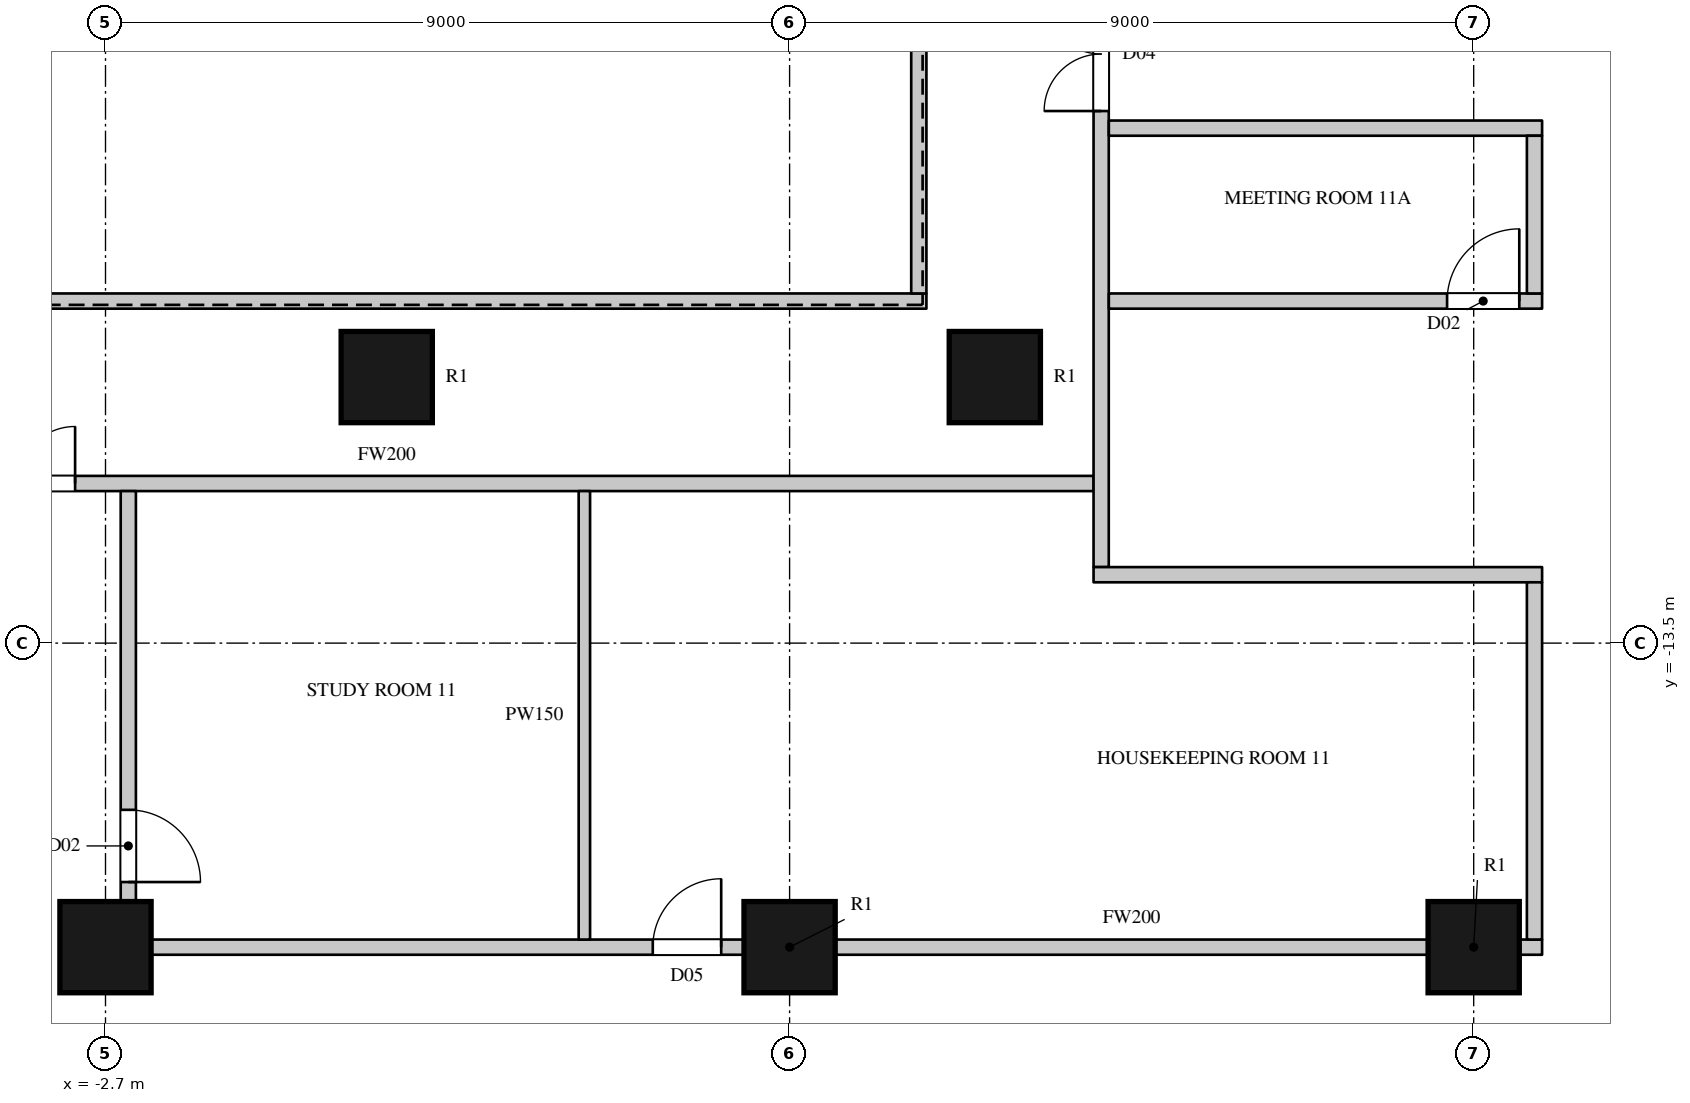
"""IFC4 building model, lengths in metres.
Left out: names, types, materials, properties, quantities, classifications, styles, units other than length and angle.
Written with IfcOpenShell. Run it as: python <this file> out.ifc"""

import sys

from ifc_helpers import new_model, si_unit, direction, frame, frame_2d, origin, origin_2d, place, context, subcontext, project, spatial, rectangle, circle, extrude, element, fill, save


model = new_model("IFC4")
c1 = context("Model", 3, precision=1e-05, world=origin(), true_north=direction((0.0, 1.0)))
c2 = subcontext(c1, "Body", "Model", "MODEL_VIEW")
j1 = project(units=[si_unit("LENGTHUNIT", "METRE"), si_unit("PLANEANGLEUNIT", "RADIAN")], contexts=[c1])
p1 = place(None, origin())
s1 = spatial("IfcSite", under=j1, at=p1, CompositionType="ELEMENT")
p2 = place(p1, origin())
s2 = spatial("IfcBuilding", under=s1, at=p2, CompositionType="ELEMENT")
p3 = place(p2, frame((0.0, 0.0, 69.9)))
s3 = spatial("IfcBuildingStorey", under=s2, at=p3, CompositionType="ELEMENT", Elevation=69.9)
for number, where, z_axis, x_axis in (
    (1, (-2.7, -17.5, 0.0), (0.0, 0.0, 1.0), (1.0, 0.0, 0.0)),
    (2, (6.3, -17.5, 0.0), (0.0, 0.0, 1.0), (1.0, 0.0, 0.0)),
    (3, (15.3, -17.5, 0.0), (0.0, 0.0, 1.0), (1.0, 0.0, 0.0)),
    (4, (1.0, -10.0, 0.0), (0.0, 0.0, 1.0), (1.0, 0.0, 0.0)),
    (5, (9.0, -10.0, 0.0), (0.0, 0.0, 1.0), (1.0, 0.0, 0.0)),
):
    element("IfcColumn", number, at=place(p3, frame(where, z_axis=z_axis, x_axis=x_axis)), inside=s3, PredefinedType="COLUMN", context=c2, shape_type="SweptSolid", body=[
        extrude(circle(Radius=0.6, at=origin_2d()), origin(), (0.0, 0.0, 1.0), 3.6),
    ])
p4 = place(p3, frame((-8.3, -11.4, 0.0), z_axis=(0.0, 0.0, 1.0), x_axis=(1.0, 0.0, 0.0)))
e6 = element("IfcWall", 6, at=p4, inside=s3, PredefinedType="PARTITIONING", context=c2, shape_type="SweptSolid", body=[
    extrude(rectangle(XDim=18.6, YDim=0.2, at=frame_2d((9.3, 0.0))), origin(), (0.0, 0.0, 1.0), 3.3),
])
p5 = place(p4, frame((3.7, 0.0, 0.0)))
e7 = element("IfcOpeningElement", 7, at=p5, cuts=e6, PredefinedType="OPENING", context=c2, shape_type="SweptSolid", body=[
    extrude(rectangle(XDim=1.5, YDim=2.2, at=frame_2d((0.75, 1.1))), frame((0.0, 0.11, 0.0), z_axis=(0.0, -1.0, 0.0), x_axis=(1.0, 0.0, 0.0)), (0.0, 0.0, 1.0), 0.22),
])
p6 = place(p3, frame((-6.1, -9.0, 0.0), z_axis=(0.0, 0.0, 1.0), x_axis=(1.0, 0.0, 0.0)))
e8 = element("IfcWall", 8, at=p6, inside=s3, PredefinedType="PARTITIONING", context=c2, shape_type="SweptSolid", body=[
    extrude(rectangle(XDim=14.2, YDim=0.2, at=frame_2d((7.1, 0.0))), origin(), (0.0, 0.0, 1.0), 3.3),
])
p7 = place(p3, frame((-2.4, -16.943, 0.0), z_axis=(0.0, 0.0, 1.0), x_axis=(0.0, 1.0, 0.0)))
e9 = element("IfcWall", 9, at=p7, inside=s3, PredefinedType="PARTITIONING", context=c2, shape_type="SweptSolid", body=[
    extrude(rectangle(XDim=5.443, YDim=0.2, at=frame_2d((2.722, 0.0))), origin(), (0.0, 0.0, 1.0), 3.3),
])
p8 = place(p7, frame((0.3, 0.0, 0.0)))
e10 = element("IfcOpeningElement", 10, at=p8, cuts=e9, PredefinedType="OPENING", context=c2, shape_type="SweptSolid", body=[
    extrude(rectangle(XDim=0.95, YDim=2.2, at=frame_2d((0.475, 1.1))), frame((0.0, 0.11, 0.0), z_axis=(0.0, -1.0, 0.0), x_axis=(1.0, 0.0, 0.0)), (0.0, 0.0, 1.0), 0.22),
])
p9 = place(p3, frame((-2.1, -17.5, 0.0), z_axis=(0.0, 0.0, 1.0), x_axis=(1.0, 0.0, 0.0)))
e11 = element("IfcWall", 11, at=p9, inside=s3, PredefinedType="PARTITIONING", context=c2, shape_type="SweptSolid", body=[
    extrude(rectangle(XDim=7.8, YDim=0.2, at=frame_2d((3.9, 0.0))), origin(), (0.0, 0.0, 1.0), 2.75),
])
p10 = place(p9, frame((6.6, 0.0, 0.0)))
e12 = element("IfcOpeningElement", 12, at=p10, cuts=e11, PredefinedType="OPENING", context=c2, shape_type="SweptSolid", body=[
    extrude(rectangle(XDim=0.9, YDim=2.2, at=frame_2d((0.45, 1.1))), frame((0.0, 0.11, 0.0), z_axis=(0.0, -1.0, 0.0), x_axis=(1.0, 0.0, 0.0)), (0.0, 0.0, 1.0), 0.22),
])
p11 = place(p3, frame((6.9, -17.5, 0.0), z_axis=(0.0, 0.0, 1.0), x_axis=(1.0, 0.0, 0.0)))
e13 = element("IfcWall", 13, at=p11, inside=s3, PredefinedType="PARTITIONING", context=c2, shape_type="SweptSolid", body=[
    extrude(rectangle(XDim=7.8, YDim=0.2, at=frame_2d((3.9, 0.0))), origin(), (0.0, 0.0, 1.0), 2.75),
])
p12 = place(p3, frame((15.9, -17.5, 0.0), z_axis=(0.0, 0.0, 1.0), x_axis=(1.0, 0.0, 0.0)))
e14 = element("IfcWall", 14, at=p12, inside=s3, PredefinedType="PARTITIONING", context=c2, shape_type="SweptSolid", body=[
    extrude(rectangle(XDim=0.3, YDim=0.2, at=frame_2d((0.15, 0.0))), origin(), (0.0, 0.0, 1.0), 3.3),
])
p13 = place(p3, frame((8.0, -8.9, 0.0), z_axis=(0.0, 0.0, 1.0), x_axis=(0.0, 1.0, 0.0)))
e15 = element("IfcWall", 15, at=p13, inside=s3, PredefinedType="PARTITIONING", context=c2, shape_type="SweptSolid", body=[
    extrude(rectangle(XDim=17.8, YDim=0.2, at=frame_2d((8.9, 0.0))), origin(), (0.0, 0.0, 1.0), 3.3),
])
p14 = place(p3, frame((10.399, -12.5, 0.0), z_axis=(0.0, 0.0, 1.0), x_axis=(0.0, 1.0, 0.0)))
e16 = element("IfcWall", 16, at=p14, inside=s3, PredefinedType="PARTITIONING", context=c2, shape_type="SweptSolid", body=[
    extrude(rectangle(XDim=23.8, YDim=0.2, at=frame_2d((11.9, 0.0))), origin(), (0.0, 0.0, 1.0), 3.3),
])
p15 = place(p14, frame((6.0, 0.0, 0.0)))
e17 = element("IfcOpeningElement", 17, at=p15, cuts=e16, PredefinedType="OPENING", context=c2, shape_type="SweptSolid", body=[
    extrude(rectangle(XDim=1.5, YDim=2.2, at=frame_2d((0.75, 1.1))), frame((0.0, 0.11, 0.0), z_axis=(0.0, -1.0, 0.0), x_axis=(1.0, 0.0, 0.0)), (0.0, 0.0, 1.0), 0.22),
])
p16 = place(p14, frame((17.5, 0.0, 0.0)))
e18 = element("IfcOpeningElement", 18, at=p16, cuts=e16, PredefinedType="OPENING", context=c2, shape_type="SweptSolid", body=[
    extrude(rectangle(XDim=1.5, YDim=2.2, at=frame_2d((0.75, 1.1))), frame((0.0, 0.11, 0.0), z_axis=(0.0, -1.0, 0.0), x_axis=(1.0, 0.0, 0.0)), (0.0, 0.0, 1.0), 0.22),
])
p17 = place(p14, frame((7.7, 0.0, 0.0)))
e19 = element("IfcOpeningElement", 19, at=p17, cuts=e16, PredefinedType="OPENING", context=c2, shape_type="SweptSolid", body=[
    extrude(rectangle(XDim=1.5, YDim=2.2, at=frame_2d((0.75, 1.1))), frame((0.0, 0.11, 0.0), z_axis=(0.0, -1.0, 0.0), x_axis=(1.0, 0.0, 0.0)), (0.0, 0.0, 1.0), 0.22),
])
p18 = place(p14, frame((13.15, 0.0, 0.0)))
e20 = element("IfcOpeningElement", 20, at=p18, cuts=e16, PredefinedType="OPENING", context=c2, shape_type="SweptSolid", body=[
    extrude(rectangle(XDim=1.5, YDim=2.2, at=frame_2d((0.75, 1.1))), frame((0.0, 0.11, 0.0), z_axis=(0.0, -1.0, 0.0), x_axis=(1.0, 0.0, 0.0)), (0.0, 0.0, 1.0), 0.22),
])
p19 = place(p3, frame((10.299, -12.6, 0.0), z_axis=(0.0, 0.0, 1.0), x_axis=(1.0, 0.0, 0.0)))
e21 = element("IfcWall", 21, at=p19, inside=s3, PredefinedType="PARTITIONING", context=c2, shape_type="SweptSolid", body=[
    extrude(rectangle(XDim=5.901, YDim=0.2, at=frame_2d((2.95, 0.0))), origin(), (0.0, 0.0, 1.0), 3.3),
])
p20 = place(p3, frame((10.5, -9.0, 0.0), z_axis=(0.0, 0.0, 1.0), x_axis=(1.0, 0.0, 0.0)))
e22 = element("IfcWall", 22, at=p20, inside=s3, PredefinedType="PARTITIONING", context=c2, shape_type="SweptSolid", body=[
    extrude(rectangle(XDim=5.7, YDim=0.2, at=frame_2d((2.85, 0.0))), origin(), (0.0, 0.0, 1.0), 2.65),
])
p21 = place(p20, frame((4.45, 0.0, 0.0)))
e23 = element("IfcOpeningElement", 23, at=p21, cuts=e22, PredefinedType="OPENING", context=c2, shape_type="SweptSolid", body=[
    extrude(rectangle(XDim=0.95, YDim=2.2, at=frame_2d((0.475, 1.1))), frame((0.0, 0.11, 0.0), z_axis=(0.0, -1.0, 0.0), x_axis=(1.0, 0.0, 0.0)), (0.0, 0.0, 1.0), 0.22),
])
p22 = place(p3, frame((10.5, -6.725, 0.0), z_axis=(0.0, 0.0, 1.0), x_axis=(1.0, 0.0, 0.0)))
e24 = element("IfcWall", 24, at=p22, inside=s3, PredefinedType="PARTITIONING", context=c2, shape_type="SweptSolid", body=[
    extrude(rectangle(XDim=5.7, YDim=0.2, at=frame_2d((2.85, 0.0))), origin(), (0.0, 0.0, 1.0), 3.3),
])
p23 = place(p3, frame((16.1, -17.4, 0.0), z_axis=(0.0, 0.0, 1.0), x_axis=(0.0, 1.0, 0.0)))
e25 = element("IfcWall", 25, at=p23, inside=s3, PredefinedType="PARTITIONING", context=c2, shape_type="SweptSolid", body=[
    extrude(rectangle(XDim=4.7, YDim=0.2, at=frame_2d((2.35, 0.0))), origin(), (0.0, 0.0, 1.0), 3.3),
])
p24 = place(p3, frame((16.1, -8.9, 0.0), z_axis=(0.0, 0.0, 1.0), x_axis=(0.0, 1.0, 0.0)))
e26 = element("IfcWall", 26, at=p24, inside=s3, PredefinedType="PARTITIONING", context=c2, shape_type="SweptSolid", body=[
    extrude(rectangle(XDim=2.075, YDim=0.2, at=frame_2d((1.038, 0.0))), origin(), (0.0, 0.0, 1.0), 3.3),
])
p25 = place(p3, frame((3.6, -17.4, 0.0), z_axis=(0.0, 0.0, 1.0), x_axis=(0.0, 1.0, 0.0)))
e27 = element("IfcWall", 27, at=p25, inside=s3, PredefinedType="PARTITIONING", context=c2, shape_type="SweptSolid", body=[
    extrude(rectangle(XDim=5.9, YDim=0.15, at=frame_2d((2.95, 0.0))), origin(), (0.0, 0.0, 1.0), 3.3),
])
p26 = place(p5, origin())
e28 = element("IfcDoor", 28, at=p26, inside=s3, OperationType="DOUBLE_DOOR_SINGLE_SWING", PredefinedType="DOOR", context=c2, shape_type="SweptSolid", body=[
    extrude(rectangle(XDim=1.5, YDim=2.2, at=frame_2d((0.75, 1.1))), frame((0.0, 0.025, 0.0), z_axis=(0.0, -1.0, 0.0), x_axis=(1.0, 0.0, 0.0)), (0.0, 0.0, 1.0), 0.05),
])
fill(e7, e28)
p27 = place(p15, origin())
e29 = element("IfcDoor", 29, at=p27, inside=s3, OperationType="DOUBLE_DOOR_SINGLE_SWING", PredefinedType="DOOR", context=c2, shape_type="SweptSolid", body=[
    extrude(rectangle(XDim=1.5, YDim=2.2, at=frame_2d((0.75, 1.1))), frame((0.0, 0.025, 0.0), z_axis=(0.0, -1.0, 0.0), x_axis=(1.0, 0.0, 0.0)), (0.0, 0.0, 1.0), 0.05),
])
fill(e17, e29)
p28 = place(p8, origin())
e30 = element("IfcDoor", 30, at=p28, inside=s3, OperationType="SINGLE_SWING_RIGHT", PredefinedType="DOOR", context=c2, shape_type="SweptSolid", body=[
    extrude(rectangle(XDim=0.95, YDim=2.2, at=frame_2d((0.475, 1.1))), frame((0.0, 0.025, 0.0), z_axis=(0.0, -1.0, 0.0), x_axis=(1.0, 0.0, 0.0)), (0.0, 0.0, 1.0), 0.05),
])
fill(e10, e30)
p29 = place(p10, origin())
e31 = element("IfcDoor", 31, at=p29, inside=s3, OperationType="SINGLE_SWING_RIGHT", PredefinedType="DOOR", context=c2, shape_type="SweptSolid", body=[
    extrude(rectangle(XDim=0.9, YDim=2.2, at=frame_2d((0.45, 1.1))), frame((0.0, 0.025, 0.0), z_axis=(0.0, -1.0, 0.0), x_axis=(1.0, 0.0, 0.0)), (0.0, 0.0, 1.0), 0.05),
])
fill(e12, e31)
p30 = place(p21, origin())
e32 = element("IfcDoor", 32, at=p30, inside=s3, OperationType="SINGLE_SWING_RIGHT", PredefinedType="DOOR", context=c2, shape_type="SweptSolid", body=[
    extrude(rectangle(XDim=0.95, YDim=2.2, at=frame_2d((0.475, 1.1))), frame((0.0, 0.025, 0.0), z_axis=(0.0, -1.0, 0.0), x_axis=(1.0, 0.0, 0.0)), (0.0, 0.0, 1.0), 0.05),
])
fill(e23, e32)
save(model, sys.argv[1])
